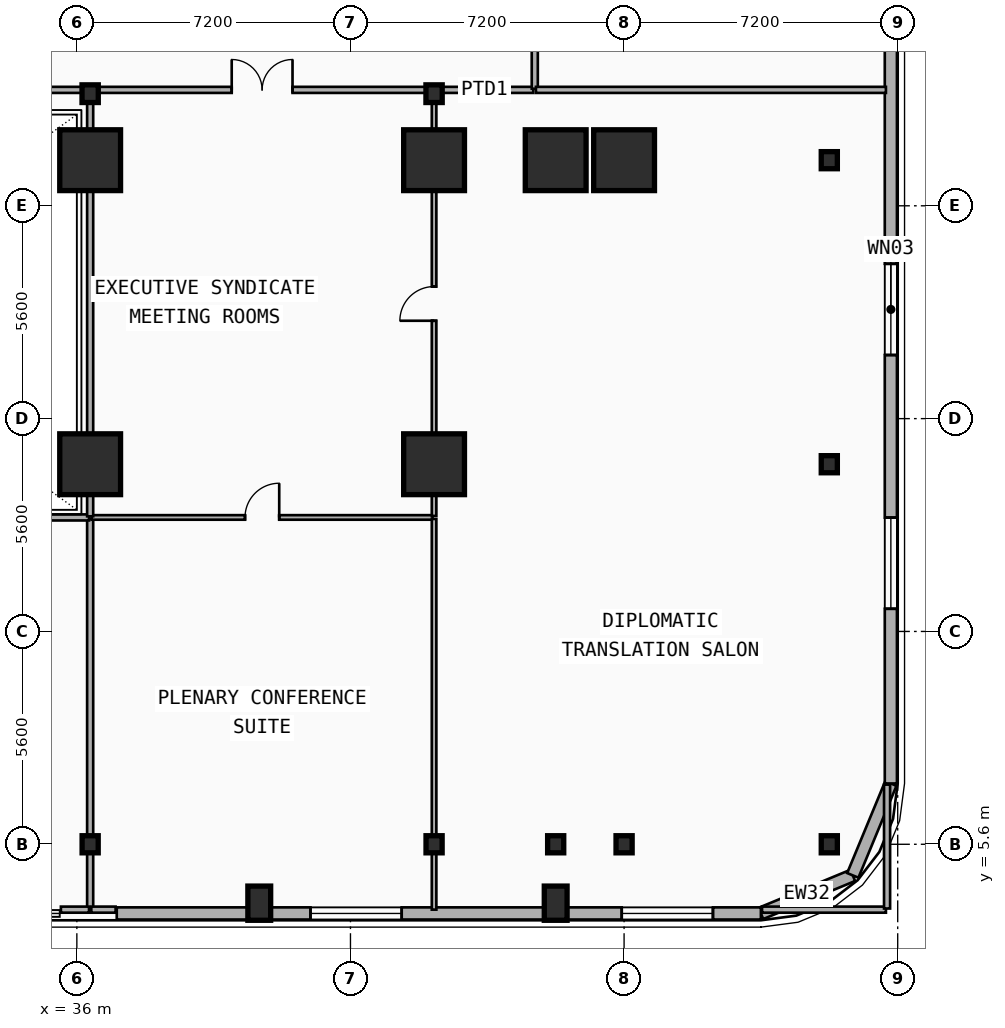
"""IFC4 building model, lengths in metres.
Left out: names, types, materials, properties, quantities, classifications, styles, units other than length and angle.
Written with IfcOpenShell. Run it as: python <this file> out.ifc"""

import sys

from ifc_helpers import new_model, si_unit, direction, frame, frame_2d, origin, origin_2d, place, context, subcontext, project, spatial, rectangle, i_section, extrude, element, fill, save


model = new_model("IFC4")
c1 = context("Model", 3, precision=1e-05, world=origin(), true_north=direction((0.0, 1.0)))
c2 = subcontext(c1, "Body", "Model", "MODEL_VIEW")
j1 = project(units=[si_unit("LENGTHUNIT", "METRE"), si_unit("PLANEANGLEUNIT", "RADIAN")], contexts=[c1])
p1 = place(None, origin())
s1 = spatial("IfcSite", under=j1, at=p1, CompositionType="ELEMENT")
p2 = place(p1, origin())
s2 = spatial("IfcBuilding", under=s1, at=p2, CompositionType="ELEMENT")
p3 = place(p2, frame((0.0, 0.0, 19.4)))
s3 = spatial("IfcBuildingStorey", under=s2, at=p3, CompositionType="ELEMENT", Elevation=19.4)
for number, where, z_axis, x_axis in (
    (1, (36.35, 25.35, 0.0), (0.0, 0.0, 1.0), (1.0, 0.0, 0.0)),
    (2, (45.4, 25.35, 0.0), (0.0, 0.0, 1.0), (1.0, 0.0, 0.0)),
):
    element("IfcColumn", number, at=place(p3, frame(where, z_axis=z_axis, x_axis=x_axis)), inside=s3, PredefinedType="COLUMN", context=c2, shape_type="SweptSolid", body=[
        extrude(i_section(OverallWidth=0.428, OverallDepth=0.465, WebThickness=0.045, FlangeThickness=0.073, FilletRadius=0.015, at=origin_2d()), origin(), (0.0, 0.0, 1.0), 4.8),
    ])
p4 = place(p3, frame((36.35, 5.6, 0.0), z_axis=(0.0, 0.0, 1.0), x_axis=(1.0, 0.0, 0.0)))
e3 = element("IfcColumn", 3, at=p4, inside=s3, PredefinedType="COLUMN", context=c2, shape_type="SweptSolid", body=[
    extrude(i_section(OverallWidth=0.424, OverallDepth=0.45, WebThickness=0.041, FlangeThickness=0.065, FilletRadius=0.015, at=origin_2d()), origin(), (0.0, 0.0, 1.0), 4.8),
])
for number, where, z_axis, x_axis in (
    (4, (36.35, 15.6, 0.0), (0.0, 0.0, 1.0), (1.0, 0.0, 0.0)),
    (5, (36.35, 23.6, 0.0), (0.0, 0.0, 1.0), (1.0, 0.0, 0.0)),
):
    element("IfcColumn", number, at=place(p3, frame(where, z_axis=z_axis, x_axis=x_axis)), inside=s3, PredefinedType="COLUMN", context=c2, shape_type="SweptSolid", body=[
        extrude(rectangle(XDim=1.6, YDim=1.6, at=origin_2d()), origin(), (0.0, 0.0, 1.0), 4.8),
    ])
p5 = place(p3, frame((45.4, 5.6, 0.0), z_axis=(0.0, 0.0, 1.0), x_axis=(1.0, 0.0, 0.0)))
e6 = element("IfcColumn", 6, at=p5, inside=s3, PredefinedType="COLUMN", context=c2, shape_type="SweptSolid", body=[
    extrude(i_section(OverallWidth=0.424, OverallDepth=0.45, WebThickness=0.041, FlangeThickness=0.065, FilletRadius=0.015, at=origin_2d()), origin(), (0.0, 0.0, 1.0), 4.8),
])
for number, where, z_axis, x_axis in (
    (7, (45.4, 15.6, 0.0), (0.0, 0.0, 1.0), (1.0, 0.0, 0.0)),
    (8, (45.4, 23.6, 0.0), (0.0, 0.0, 1.0), (1.0, 0.0, 0.0)),
):
    element("IfcColumn", number, at=place(p3, frame(where, z_axis=z_axis, x_axis=x_axis)), inside=s3, PredefinedType="COLUMN", context=c2, shape_type="SweptSolid", body=[
        extrude(rectangle(XDim=1.6, YDim=1.6, at=origin_2d()), origin(), (0.0, 0.0, 1.0), 4.8),
    ])
p6 = place(p3, frame((48.6, 5.6, 0.0), z_axis=(0.0, 0.0, 1.0), x_axis=(1.0, 0.0, 0.0)))
e9 = element("IfcColumn", 9, at=p6, inside=s3, PredefinedType="COLUMN", context=c2, shape_type="SweptSolid", body=[
    extrude(i_section(OverallWidth=0.424, OverallDepth=0.45, WebThickness=0.041, FlangeThickness=0.065, FilletRadius=0.015, at=origin_2d()), origin(), (0.0, 0.0, 1.0), 4.8),
])
p7 = place(p3, frame((48.6, 23.6, 0.0), z_axis=(0.0, 0.0, 1.0), x_axis=(1.0, 0.0, 0.0)))
e10 = element("IfcColumn", 10, at=p7, inside=s3, PredefinedType="COLUMN", context=c2, shape_type="SweptSolid", body=[
    extrude(rectangle(XDim=1.6, YDim=1.6, at=origin_2d()), origin(), (0.0, 0.0, 1.0), 4.8),
])
p8 = place(p3, frame((50.4, 5.6, 0.0), z_axis=(0.0, 0.0, 1.0), x_axis=(1.0, 0.0, 0.0)))
e11 = element("IfcColumn", 11, at=p8, inside=s3, PredefinedType="COLUMN", context=c2, shape_type="SweptSolid", body=[
    extrude(i_section(OverallWidth=0.424, OverallDepth=0.45, WebThickness=0.041, FlangeThickness=0.065, FilletRadius=0.015, at=origin_2d()), origin(), (0.0, 0.0, 1.0), 4.8),
])
p9 = place(p3, frame((50.4, 23.6, 0.0), z_axis=(0.0, 0.0, 1.0), x_axis=(1.0, 0.0, 0.0)))
e12 = element("IfcColumn", 12, at=p9, inside=s3, PredefinedType="COLUMN", context=c2, shape_type="SweptSolid", body=[
    extrude(rectangle(XDim=1.6, YDim=1.6, at=origin_2d()), origin(), (0.0, 0.0, 1.0), 4.8),
])
for number, where, z_axis, x_axis in (
    (13, (55.8, 5.6, 0.0), (0.0, 0.0, 1.0), (1.0, 0.0, 0.0)),
    (14, (55.8, 15.6, 0.0), (0.0, 0.0, 1.0), (1.0, 0.0, 0.0)),
    (15, (55.8, 23.6, 0.0), (0.0, 0.0, 1.0), (1.0, 0.0, 0.0)),
):
    element("IfcColumn", number, at=place(p3, frame(where, z_axis=z_axis, x_axis=x_axis)), inside=s3, PredefinedType="COLUMN", context=c2, shape_type="SweptSolid", body=[
        extrude(i_section(OverallWidth=0.424, OverallDepth=0.45, WebThickness=0.041, FlangeThickness=0.065, FilletRadius=0.015, at=origin_2d()), origin(), (0.0, 0.0, 1.0), 4.8),
    ])
for number, where, z_axis, x_axis in (
    (16, (40.8, 4.05, 0.0), (0.0, 0.0, 1.0), (1.0, 0.0, 0.0)),
    (17, (48.6, 4.05, 0.0), (0.0, 0.0, 1.0), (1.0, 0.0, 0.0)),
):
    element("IfcColumn", number, at=place(p3, frame(where, z_axis=z_axis, x_axis=x_axis)), inside=s3, PredefinedType="PILASTER", context=c2, shape_type="SweptSolid", body=[
        extrude(rectangle(XDim=0.6, YDim=0.9, at=origin_2d()), origin(), (0.0, 0.0, 1.0), 4.8),
    ])
for number, where, z_axis, x_axis in (
    (18, (56.418, 4.782, 0.0), (0.0, 0.0, 1.0), (-0.924, -0.383, 0.0)),
    (19, (57.42, 7.2, 0.0), (0.0, 0.0, 1.0), (-0.383, -0.924, 0.0)),
):
    element("IfcWall", number, at=place(p3, frame(where, z_axis=z_axis, x_axis=x_axis)), inside=s3, PredefinedType="SOLIDWALL", context=c2, shape_type="SweptSolid", body=[
        extrude(rectangle(XDim=2.617, YDim=0.32, at=frame_2d((1.309, 0.0))), origin(), (0.0, 0.0, 1.0), 4.5),
    ])
p10 = place(p3, frame((57.42, 41.6, 0.0), z_axis=(0.0, 0.0, 1.0), x_axis=(0.0, -1.0, 0.0)))
e20 = element("IfcWall", 20, at=p10, inside=s3, PredefinedType="SOLIDWALL", context=c2, shape_type="SweptSolid", body=[
    extrude(rectangle(XDim=34.4, YDim=0.32, at=frame_2d((17.2, 0.0))), origin(), (0.0, 0.0, 1.0), 4.5),
])
p11 = place(p10, frame((20.727, 0.0, 0.9)))
e21 = element("IfcOpeningElement", 21, at=p11, cuts=e20, PredefinedType="OPENING", context=c2, shape_type="SweptSolid", body=[
    extrude(rectangle(XDim=2.4, YDim=1.8, at=frame_2d((1.2, 0.9))), frame((0.0, 0.17, 0.0), z_axis=(0.0, -1.0, 0.0), x_axis=(1.0, 0.0, 0.0)), (0.0, 0.0, 1.0), 0.34),
])
p12 = place(p10, frame((27.403, 0.0, 0.9)))
e22 = element("IfcOpeningElement", 22, at=p12, cuts=e20, PredefinedType="OPENING", context=c2, shape_type="SweptSolid", body=[
    extrude(rectangle(XDim=2.4, YDim=1.8, at=frame_2d((1.2, 0.9))), frame((0.0, 0.17, 0.0), z_axis=(0.0, -1.0, 0.0), x_axis=(1.0, 0.0, 0.0)), (0.0, 0.0, 1.0), 0.34),
])
p13 = place(p3, frame((54.0, 3.78, 0.0), z_axis=(0.0, 0.0, 1.0), x_axis=(-1.0, 0.0, 0.0)))
e23 = element("IfcWall", 23, at=p13, inside=s3, PredefinedType="SOLIDWALL", context=c2, shape_type="SweptSolid", body=[
    extrude(rectangle(XDim=16.95, YDim=0.32, at=frame_2d((8.475, 0.0))), origin(), (0.0, 0.0, 1.0), 4.5),
])
p14 = place(p13, frame((9.452, 0.0, 0.9)))
e24 = element("IfcOpeningElement", 24, at=p14, cuts=e23, PredefinedType="OPENING", context=c2, shape_type="SweptSolid", body=[
    extrude(rectangle(XDim=2.4, YDim=1.8, at=frame_2d((1.2, 0.9))), frame((0.0, 0.17, 0.0), z_axis=(0.0, -1.0, 0.0), x_axis=(1.0, 0.0, 0.0)), (0.0, 0.0, 1.0), 0.34),
])
p15 = place(p13, frame((1.262, 0.0, 0.9)))
e25 = element("IfcOpeningElement", 25, at=p15, cuts=e23, PredefinedType="OPENING", context=c2, shape_type="SweptSolid", body=[
    extrude(rectangle(XDim=2.4, YDim=1.8, at=frame_2d((1.2, 0.9))), frame((0.0, 0.17, 0.0), z_axis=(0.0, -1.0, 0.0), x_axis=(1.0, 0.0, 0.0)), (0.0, 0.0, 1.0), 0.34),
])
p16 = place(p3, frame((36.39, 25.45, 0.0), z_axis=(0.0, 0.0, 1.0), x_axis=(1.0, 0.0, 0.0)))
e26 = element("IfcWall", 26, at=p16, inside=s3, PredefinedType="PARTITIONING", context=c2, shape_type="SweptSolid", body=[
    extrude(rectangle(XDim=8.97, YDim=0.16, at=frame_2d((4.485, 0.0))), origin(), (0.0, 0.0, 1.0), 3.666),
])
p17 = place(p16, frame((3.685, 0.0, 0.0)))
e27 = element("IfcOpeningElement", 27, at=p17, cuts=e26, PredefinedType="OPENING", context=c2, shape_type="SweptSolid", body=[
    extrude(rectangle(XDim=1.6, YDim=2.2, at=frame_2d((0.8, 1.1))), frame((0.0, 0.09, 0.0), z_axis=(0.0, -1.0, 0.0), x_axis=(1.0, 0.0, 0.0)), (0.0, 0.0, 1.0), 0.18),
])
p18 = place(p3, frame((45.44, 25.45, 0.0), z_axis=(0.0, 0.0, 1.0), x_axis=(1.0, 0.0, 0.0)))
e28 = element("IfcWall", 28, at=p18, inside=s3, PredefinedType="PARTITIONING", context=c2, shape_type="SweptSolid", body=[
    extrude(rectangle(XDim=2.57, YDim=0.16, at=frame_2d((1.285, 0.0))), origin(), (0.0, 0.0, 1.0), 3.666),
])
p19 = place(p3, frame((36.35, 3.88, 0.0), z_axis=(0.0, 0.0, 1.0), x_axis=(0.0, 1.0, 0.0)))
e29 = element("IfcWall", 29, at=p19, inside=s3, PredefinedType="PARTITIONING", context=c2, shape_type="SweptSolid", body=[
    extrude(rectangle(XDim=10.28, YDim=0.16, at=frame_2d((5.14, 0.0))), origin(), (0.0, 0.0, 1.0), 3.666),
])
p20 = place(p3, frame((36.39, 14.2, 0.0), z_axis=(0.0, 0.0, 1.0), x_axis=(1.0, 0.0, 0.0)))
e30 = element("IfcWall", 30, at=p20, inside=s3, PredefinedType="PARTITIONING", context=c2, shape_type="SweptSolid", body=[
    extrude(rectangle(XDim=8.97, YDim=0.12, at=frame_2d((4.485, 0.0))), origin(), (0.0, 0.0, 1.0), 3.666),
])
p21 = place(p20, frame((4.035, 0.0, 0.0)))
e31 = element("IfcOpeningElement", 31, at=p21, cuts=e30, PredefinedType="OPENING", context=c2, shape_type="SweptSolid", body=[
    extrude(rectangle(XDim=0.9, YDim=2.1, at=frame_2d((0.45, 1.05))), frame((0.0, 0.07, 0.0), z_axis=(0.0, -1.0, 0.0), x_axis=(1.0, 0.0, 0.0)), (0.0, 0.0, 1.0), 0.14),
])
p22 = place(p3, frame((45.4, 3.88, 0.0), z_axis=(0.0, 0.0, 1.0), x_axis=(0.0, 1.0, 0.0)))
e32 = element("IfcWall", 32, at=p22, inside=s3, PredefinedType="PARTITIONING", context=c2, shape_type="SweptSolid", body=[
    extrude(rectangle(XDim=10.28, YDim=0.12, at=frame_2d((5.14, 0.0))), origin(), (0.0, 0.0, 1.0), 3.666),
])
p23 = place(p3, frame((45.4, 14.24, 0.0), z_axis=(0.0, 0.0, 1.0), x_axis=(0.0, 1.0, 0.0)))
e33 = element("IfcWall", 33, at=p23, inside=s3, PredefinedType="PARTITIONING", context=c2, shape_type="SweptSolid", body=[
    extrude(rectangle(XDim=11.17, YDim=0.12, at=frame_2d((5.585, 0.0))), origin(), (0.0, 0.0, 1.0), 3.472),
])
p24 = place(p23, frame((5.135, 0.0, 0.0)))
e34 = element("IfcOpeningElement", 34, at=p24, cuts=e33, PredefinedType="OPENING", context=c2, shape_type="SweptSolid", body=[
    extrude(rectangle(XDim=0.9, YDim=2.1, at=frame_2d((0.45, 1.05))), frame((0.0, 0.07, 0.0), z_axis=(0.0, -1.0, 0.0), x_axis=(1.0, 0.0, 0.0)), (0.0, 0.0, 1.0), 0.14),
])
p25 = place(p3, frame((20.38, 25.45, 0.0), z_axis=(0.0, 0.0, 1.0), x_axis=(1.0, 0.0, 0.0)))
e35 = element("IfcWall", 35, at=p25, inside=s3, PredefinedType="PARTITIONING", context=c2, shape_type="SweptSolid", body=[
    extrude(rectangle(XDim=15.94, YDim=0.16, at=frame_2d((7.97, 0.0))), origin(), (0.0, 0.0, 1.0), 3.666),
])
p26 = place(p3, frame((48.05, 25.48, 0.0), z_axis=(0.0, 0.0, 1.0), x_axis=(0.0, 1.0, 0.0)))
e36 = element("IfcWall", 36, at=p26, inside=s3, PredefinedType="PARTITIONING", context=c2, shape_type="SweptSolid", body=[
    extrude(rectangle(XDim=2.09, YDim=0.16, at=frame_2d((1.045, 0.0))), origin(), (0.0, 0.0, 1.0), 4.5),
])
p27 = place(p3, frame((35.58, 3.88, 0.0), z_axis=(0.0, 0.0, 1.0), x_axis=(1.0, 0.0, 0.0)))
e37 = element("IfcWall", 37, at=p27, inside=s3, PredefinedType="PARTITIONING", context=c2, shape_type="SweptSolid", body=[
    extrude(rectangle(XDim=0.74, YDim=0.16, at=frame_2d((0.37, 0.0))), origin(), (0.0, 0.0, 1.0), 4.5),
])
p28 = place(p3, frame((20.38, 14.2, 0.0), z_axis=(0.0, 0.0, 1.0), x_axis=(1.0, 0.0, 0.0)))
e38 = element("IfcWall", 38, at=p28, inside=s3, PredefinedType="PARTITIONING", context=c2, shape_type="SweptSolid", body=[
    extrude(rectangle(XDim=15.94, YDim=0.16, at=frame_2d((7.97, 0.0))), origin(), (0.0, 0.0, 1.0), 3.666),
])
p29 = place(p3, frame((36.38, 3.88, 0.0), z_axis=(0.0, 0.0, 1.0), x_axis=(1.0, 0.0, 0.0)))
e39 = element("IfcWall", 39, at=p29, inside=s3, PredefinedType="PARTITIONING", context=c2, shape_type="SweptSolid", body=[
    extrude(rectangle(XDim=0.64, YDim=0.16, at=frame_2d((0.32, 0.0))), origin(), (0.0, 0.0, 1.0), 4.5),
])
p30 = place(p3, frame((36.35, 14.23, 0.0), z_axis=(0.0, 0.0, 1.0), x_axis=(0.0, 1.0, 0.0)))
e40 = element("IfcWall", 40, at=p30, inside=s3, PredefinedType="PARTITIONING", context=c2, shape_type="SweptSolid", body=[
    extrude(rectangle(XDim=11.19, YDim=0.16, at=frame_2d((5.595, 0.0))), origin(), (0.0, 0.0, 1.0), 3.472),
])
p31 = place(p3, frame((54.03, 3.88, 0.0), z_axis=(0.0, 0.0, 1.0), x_axis=(1.0, 0.0, 0.0)))
e41 = element("IfcWall", 41, at=p31, inside=s3, PredefinedType="PARTITIONING", context=c2, shape_type="SweptSolid", body=[
    extrude(rectangle(XDim=3.26, YDim=0.16, at=frame_2d((1.63, 0.0))), origin(), (0.0, 0.0, 1.0), 4.5),
])
p32 = place(p3, frame((48.08, 25.45, 0.0), z_axis=(0.0, 0.0, 1.0), x_axis=(1.0, 0.0, 0.0)))
e42 = element("IfcWall", 42, at=p32, inside=s3, PredefinedType="PARTITIONING", context=c2, shape_type="SweptSolid", body=[
    extrude(rectangle(XDim=9.21, YDim=0.16, at=frame_2d((4.605, 0.0))), origin(), (0.0, 0.0, 1.0), 4.5),
])
p33 = place(p3, frame((57.32, 3.91, 0.0), z_axis=(0.0, 0.0, 1.0), x_axis=(0.0, 1.0, 0.0)))
e43 = element("IfcWall", 43, at=p33, inside=s3, PredefinedType="PARTITIONING", context=c2, shape_type="SweptSolid", body=[
    extrude(rectangle(XDim=3.26, YDim=0.16, at=frame_2d((1.63, 0.0))), origin(), (0.0, 0.0, 1.0), 4.5),
])
p34 = place(p11, origin())
e44 = element("IfcWindow", 44, at=p34, inside=s3, PartitioningType="SINGLE_PANEL", PredefinedType="WINDOW", context=c2, shape_type="SweptSolid", body=[
    extrude(rectangle(XDim=2.4, YDim=1.8, at=frame_2d((1.2, 0.9))), frame((0.0, 0.03, 0.0), z_axis=(0.0, -1.0, 0.0), x_axis=(1.0, 0.0, 0.0)), (0.0, 0.0, 1.0), 0.06),
])
fill(e21, e44)
p35 = place(p12, origin())
e45 = element("IfcWindow", 45, at=p35, inside=s3, PartitioningType="SINGLE_PANEL", PredefinedType="WINDOW", context=c2, shape_type="SweptSolid", body=[
    extrude(rectangle(XDim=2.4, YDim=1.8, at=frame_2d((1.2, 0.9))), frame((0.0, 0.03, 0.0), z_axis=(0.0, -1.0, 0.0), x_axis=(1.0, 0.0, 0.0)), (0.0, 0.0, 1.0), 0.06),
])
fill(e22, e45)
p36 = place(p14, origin())
e46 = element("IfcWindow", 46, at=p36, inside=s3, PartitioningType="SINGLE_PANEL", PredefinedType="WINDOW", context=c2, shape_type="SweptSolid", body=[
    extrude(rectangle(XDim=2.4, YDim=1.8, at=frame_2d((1.2, 0.9))), frame((0.0, 0.03, 0.0), z_axis=(0.0, -1.0, 0.0), x_axis=(1.0, 0.0, 0.0)), (0.0, 0.0, 1.0), 0.06),
])
fill(e24, e46)
p37 = place(p15, origin())
e47 = element("IfcWindow", 47, at=p37, inside=s3, PartitioningType="SINGLE_PANEL", PredefinedType="WINDOW", context=c2, shape_type="SweptSolid", body=[
    extrude(rectangle(XDim=2.4, YDim=1.8, at=frame_2d((1.2, 0.9))), frame((0.0, 0.03, 0.0), z_axis=(0.0, -1.0, 0.0), x_axis=(1.0, 0.0, 0.0)), (0.0, 0.0, 1.0), 0.06),
])
fill(e25, e47)
p38 = place(p17, origin())
e48 = element("IfcDoor", 48, at=p38, inside=s3, OperationType="SINGLE_SWING_LEFT", PredefinedType="DOOR", context=c2, shape_type="SweptSolid", body=[
    extrude(rectangle(XDim=1.6, YDim=2.2, at=frame_2d((0.8, 1.1))), frame((0.0, 0.025, 0.0), z_axis=(0.0, -1.0, 0.0), x_axis=(1.0, 0.0, 0.0)), (0.0, 0.0, 1.0), 0.05),
])
fill(e27, e48)
p39 = place(p21, origin())
e49 = element("IfcDoor", 49, at=p39, inside=s3, OperationType="SINGLE_SWING_RIGHT", PredefinedType="DOOR", context=c2, shape_type="SweptSolid", body=[
    extrude(rectangle(XDim=0.9, YDim=2.1, at=frame_2d((0.45, 1.05))), frame((0.0, 0.025, 0.0), z_axis=(0.0, -1.0, 0.0), x_axis=(1.0, 0.0, 0.0)), (0.0, 0.0, 1.0), 0.05),
])
fill(e31, e49)
p40 = place(p24, origin())
e50 = element("IfcDoor", 50, at=p40, inside=s3, OperationType="SINGLE_SWING_LEFT", PredefinedType="DOOR", context=c2, shape_type="SweptSolid", body=[
    extrude(rectangle(XDim=0.9, YDim=2.1, at=frame_2d((0.45, 1.05))), frame((0.0, 0.025, 0.0), z_axis=(0.0, -1.0, 0.0), x_axis=(1.0, 0.0, 0.0)), (0.0, 0.0, 1.0), 0.05),
])
fill(e34, e50)
save(model, sys.argv[1])
